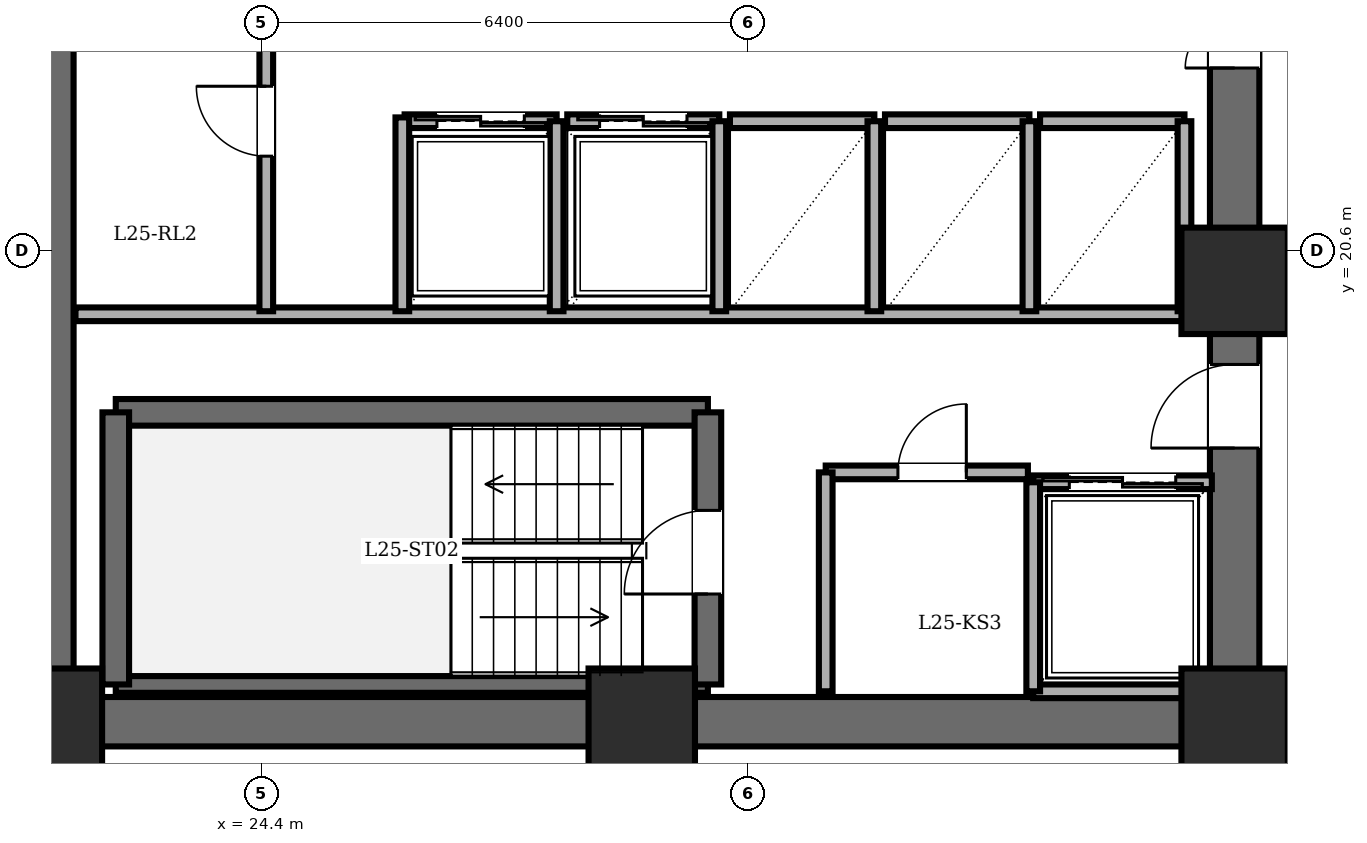
"""IFC4 building model, lengths in metres.
Left out: names, types, materials, properties, quantities, classifications, styles, units other than length and angle.
Written with IfcOpenShell. Run it as: python <this file> out.ifc"""

import sys

from ifc_helpers import new_model, si_unit, direction, frame, frame_2d, origin, origin_2d, place, context, subcontext, project, spatial, rectangle, extrude, element, fill, save


model = new_model("IFC4")
c1 = context("Model", 3, precision=1e-05, world=origin(), true_north=direction((0.0, 1.0)))
c2 = subcontext(c1, "Body", "Model", "MODEL_VIEW")
j1 = project(units=[si_unit("LENGTHUNIT", "METRE"), si_unit("PLANEANGLEUNIT", "RADIAN")], contexts=[c1])
p1 = place(None, origin())
s1 = spatial("IfcSite", under=j1, at=p1, CompositionType="ELEMENT")
p2 = place(p1, origin())
s2 = spatial("IfcBuilding", under=s1, at=p2, CompositionType="ELEMENT")
p3 = place(p2, frame((0.0, 0.0, 97.1)))
s3 = spatial("IfcBuildingStorey", under=s2, at=p3, CompositionType="ELEMENT", Elevation=97.1)
for number, where, z_axis, x_axis in (
    (1, (21.6, 14.4, 0.0), (0.0, 0.0, 1.0), (1.0, 0.0, 0.0)),
    (2, (29.4, 14.4, 0.0), (0.0, 0.0, 1.0), (1.0, 0.0, 0.0)),
    (3, (37.2, 14.4, 0.0), (0.0, 0.0, 1.0), (1.0, 0.0, 0.0)),
    (4, (37.2, 20.2, 0.0), (0.0, 0.0, 1.0), (1.0, 0.0, 0.0)),
):
    element("IfcColumn", number, at=place(p3, frame(where, z_axis=z_axis, x_axis=x_axis)), inside=s3, PredefinedType="COLUMN", context=c2, shape_type="SweptSolid", body=[
        extrude(rectangle(XDim=1.4, YDim=1.4, at=origin_2d()), origin(), (0.0, 0.0, 1.0), 3.6),
    ])
p4 = place(p3, frame((21.6, 14.4, 0.0), z_axis=(0.0, 0.0, 1.0), x_axis=(0.0, 1.0, 0.0)))
e5 = element("IfcWall", 5, at=p4, inside=s3, PredefinedType="SHEAR", context=c2, shape_type="SweptSolid", body=[
    extrude(rectangle(XDim=19.2, YDim=0.65, at=frame_2d((9.6, 0.0))), origin(), (0.0, 0.0, 1.0), 3.4),
])
p5 = place(p3, frame((37.2, 14.4, 0.0), z_axis=(0.0, 0.0, 1.0), x_axis=(-1.0, 0.0, 0.0)))
e6 = element("IfcWall", 6, at=p5, inside=s3, PredefinedType="SHEAR", context=c2, shape_type="SweptSolid", body=[
    extrude(rectangle(XDim=15.6, YDim=0.65, at=frame_2d((7.8, 0.0))), origin(), (0.0, 0.0, 1.0), 3.4),
])
p6 = place(p3, frame((37.2, 14.4, 0.0), z_axis=(0.0, 0.0, 1.0), x_axis=(0.0, 1.0, 0.0)))
e7 = element("IfcWall", 7, at=p6, inside=s3, PredefinedType="SHEAR", context=c2, shape_type="SweptSolid", body=[
    extrude(rectangle(XDim=19.2, YDim=0.65, at=frame_2d((9.6, 0.0))), origin(), (0.0, 0.0, 1.0), 3.4),
])
p7 = place(p6, frame((15.8, 0.0, 0.0)))
e8 = element("IfcOpeningElement", 8, at=p7, cuts=e7, PredefinedType="OPENING", context=c2, shape_type="SweptSolid", body=[
    extrude(rectangle(XDim=1.15, YDim=2.15, at=frame_2d((0.575, 1.075))), frame((0.0, 0.335, 0.0), z_axis=(0.0, -1.0, 0.0), x_axis=(1.0, 0.0, 0.0)), (0.0, 0.0, 1.0), 0.67),
])
p8 = place(p6, frame((3.6, 0.0, 0.0)))
e9 = element("IfcOpeningElement", 9, at=p8, cuts=e7, PredefinedType="OPENING", context=c2, shape_type="SweptSolid", body=[
    extrude(rectangle(XDim=1.1, YDim=2.15, at=frame_2d((0.55, 1.075))), frame((0.0, 0.335, 0.0), z_axis=(0.0, -1.0, 0.0), x_axis=(1.0, 0.0, 0.0)), (0.0, 0.0, 1.0), 0.67),
])
p9 = place(p6, frame((8.6, 0.0, 0.0)))
e10 = element("IfcOpeningElement", 10, at=p9, cuts=e7, PredefinedType="OPENING", context=c2, shape_type="SweptSolid", body=[
    extrude(rectangle(XDim=1.3, YDim=2.2, at=frame_2d((0.65, 1.1))), frame((0.0, 0.335, 0.0), z_axis=(0.0, -1.0, 0.0), x_axis=(1.0, 0.0, 0.0)), (0.0, 0.0, 1.0), 0.67),
])
p10 = place(p3, frame((22.48, 18.47, 0.0), z_axis=(0.0, 0.0, 1.0), x_axis=(1.0, 0.0, 0.0)))
e11 = element("IfcWall", 11, at=p10, inside=s3, PredefinedType="SOLIDWALL", context=c2, shape_type="SweptSolid", body=[
    extrude(rectangle(XDim=7.79, YDim=0.35, at=frame_2d((3.895, 0.0))), origin(), (0.0, 0.0, 1.0), 3.4),
])
p11 = place(p3, frame((22.48, 14.89, 0.0), z_axis=(0.0, 0.0, 1.0), x_axis=(1.0, 0.0, 0.0)))
e12 = element("IfcWall", 12, at=p11, inside=s3, PredefinedType="PARTITIONING", context=c2, shape_type="SweptSolid", body=[
    extrude(rectangle(XDim=7.79, YDim=0.22, at=frame_2d((3.895, 0.0))), origin(), (0.0, 0.0, 1.0), 3.4),
])
p12 = place(p3, frame((22.48, 14.89, 0.0), z_axis=(0.0, 0.0, 1.0), x_axis=(0.0, 1.0, 0.0)))
e13 = element("IfcWall", 13, at=p12, inside=s3, PredefinedType="SOLIDWALL", context=c2, shape_type="SweptSolid", body=[
    extrude(rectangle(XDim=3.58, YDim=0.35, at=frame_2d((1.79, 0.0))), origin(), (0.0, 0.0, 1.0), 3.4),
])
p13 = place(p3, frame((30.27, 14.89, 0.0), z_axis=(0.0, 0.0, 1.0), x_axis=(0.0, 1.0, 0.0)))
e14 = element("IfcWall", 14, at=p13, inside=s3, PredefinedType="SOLIDWALL", context=c2, shape_type="SweptSolid", body=[
    extrude(rectangle(XDim=3.58, YDim=0.35, at=frame_2d((1.79, 0.0))), origin(), (0.0, 0.0, 1.0), 3.4),
])
p14 = place(p13, frame((1.19, 0.0, 0.0)))
e15 = element("IfcOpeningElement", 15, at=p14, cuts=e14, PredefinedType="OPENING", context=c2, shape_type="SweptSolid", body=[
    extrude(rectangle(XDim=1.1, YDim=2.15, at=frame_2d((0.55, 1.075))), frame((0.0, 0.185, 0.0), z_axis=(0.0, -1.0, 0.0), x_axis=(1.0, 0.0, 0.0)), (0.0, 0.0, 1.0), 0.37),
])
p15 = place(p3, frame((21.95, 19.76, 0.0), z_axis=(0.0, 0.0, 1.0), x_axis=(1.0, 0.0, 0.0)))
e16 = element("IfcWall", 16, at=p15, inside=s3, PredefinedType="PARTITIONING", context=c2, shape_type="SweptSolid", body=[
    extrude(rectangle(XDim=14.87, YDim=0.18, at=frame_2d((7.435, 0.0))), origin(), (0.0, 0.0, 1.0), 3.4),
])
p16 = place(p3, frame((31.82, 17.68, 0.0), z_axis=(0.0, 0.0, 1.0), x_axis=(1.0, 0.0, 0.0)))
e17 = element("IfcWall", 17, at=p16, inside=s3, PredefinedType="PARTITIONING", context=c2, shape_type="SweptSolid", body=[
    extrude(rectangle(XDim=2.66, YDim=0.18, at=frame_2d((1.33, 0.0))), origin(), (0.0, 0.0, 1.0), 3.4),
])
p17 = place(p16, frame((0.95, 0.0, 0.0)))
e18 = element("IfcOpeningElement", 18, at=p17, cuts=e17, PredefinedType="OPENING", context=c2, shape_type="SweptSolid", body=[
    extrude(rectangle(XDim=0.9, YDim=2.05, at=frame_2d((0.45, 1.025))), frame((0.0, 0.1, 0.0), z_axis=(0.0, -1.0, 0.0), x_axis=(1.0, 0.0, 0.0)), (0.0, 0.0, 1.0), 0.2),
])
p18 = place(p3, frame((31.82, 14.8, 0.0), z_axis=(0.0, 0.0, 1.0), x_axis=(0.0, 1.0, 0.0)))
e19 = element("IfcWall", 19, at=p18, inside=s3, PredefinedType="PARTITIONING", context=c2, shape_type="SweptSolid", body=[
    extrude(rectangle(XDim=2.88, YDim=0.18, at=frame_2d((1.44, 0.0))), origin(), (0.0, 0.0, 1.0), 3.4),
])
p19 = place(p3, frame((34.55, 17.55, 0.0), z_axis=(0.0, 0.0, 1.0), x_axis=(1.0, 0.0, 0.0)))
e20 = element("IfcWall", 20, at=p19, inside=s3, PredefinedType="PARTITIONING", context=c2, shape_type="SweptSolid", body=[
    extrude(rectangle(XDim=2.35, YDim=0.18, at=frame_2d((1.175, 0.0))), origin(), (0.0, 0.0, 1.0), 3.4),
])
p20 = place(p19, frame((0.475, 0.0, 0.0)))
e21 = element("IfcOpeningElement", 21, at=p20, cuts=e20, PredefinedType="OPENING", context=c2, shape_type="SweptSolid", body=[
    extrude(rectangle(XDim=1.4, YDim=2.3, at=frame_2d((0.7, 1.15))), frame((0.0, 0.1, 0.0), z_axis=(0.0, -1.0, 0.0), x_axis=(1.0, 0.0, 0.0)), (0.0, 0.0, 1.0), 0.2),
])
p21 = place(p3, frame((36.9, 14.8, 0.0), z_axis=(0.0, 0.0, 1.0), x_axis=(-1.0, 0.0, 0.0)))
e22 = element("IfcWall", 22, at=p21, inside=s3, PredefinedType="PARTITIONING", context=c2, shape_type="SweptSolid", body=[
    extrude(rectangle(XDim=2.35, YDim=0.18, at=frame_2d((1.175, 0.0))), origin(), (0.0, 0.0, 1.0), 3.4),
])
p22 = place(p3, frame((34.55, 17.55, 0.0), z_axis=(0.0, 0.0, 1.0), x_axis=(0.0, -1.0, 0.0)))
e23 = element("IfcWall", 23, at=p22, inside=s3, PredefinedType="PARTITIONING", context=c2, shape_type="SweptSolid", body=[
    extrude(rectangle(XDim=2.75, YDim=0.18, at=frame_2d((1.375, 0.0))), origin(), (0.0, 0.0, 1.0), 3.4),
])
p23 = place(p3, frame((26.28, 22.3, 0.0), z_axis=(0.0, 0.0, 1.0), x_axis=(1.0, 0.0, 0.0)))
e24 = element("IfcWall", 24, at=p23, inside=s3, PredefinedType="PARTITIONING", context=c2, shape_type="SweptSolid", body=[
    extrude(rectangle(XDim=2.0, YDim=0.18, at=frame_2d((1.0, 0.0))), origin(), (0.0, 0.0, 1.0), 3.4),
])
p24 = place(p23, frame((0.425, 0.0, 0.0)))
e25 = element("IfcOpeningElement", 25, at=p24, cuts=e24, PredefinedType="OPENING", context=c2, shape_type="SweptSolid", body=[
    extrude(rectangle(XDim=1.15, YDim=2.2, at=frame_2d((0.575, 1.1))), frame((0.0, 0.1, 0.0), z_axis=(0.0, -1.0, 0.0), x_axis=(1.0, 0.0, 0.0)), (0.0, 0.0, 1.0), 0.2),
])
p25 = place(p3, frame((28.28, 19.8, 0.0), z_axis=(0.0, 0.0, 1.0), x_axis=(0.0, 1.0, 0.0)))
e26 = element("IfcWall", 26, at=p25, inside=s3, PredefinedType="PARTITIONING", context=c2, shape_type="SweptSolid", body=[
    extrude(rectangle(XDim=2.5, YDim=0.18, at=frame_2d((1.25, 0.0))), origin(), (0.0, 0.0, 1.0), 3.4),
])
p26 = place(p3, frame((28.42, 22.3, 0.0), z_axis=(0.0, 0.0, 1.0), x_axis=(1.0, 0.0, 0.0)))
e27 = element("IfcWall", 27, at=p26, inside=s3, PredefinedType="PARTITIONING", context=c2, shape_type="SweptSolid", body=[
    extrude(rectangle(XDim=2.0, YDim=0.18, at=frame_2d((1.0, 0.0))), origin(), (0.0, 0.0, 1.0), 3.4),
])
p27 = place(p26, frame((0.425, 0.0, 0.0)))
e28 = element("IfcOpeningElement", 28, at=p27, cuts=e27, PredefinedType="OPENING", context=c2, shape_type="SweptSolid", body=[
    extrude(rectangle(XDim=1.15, YDim=2.2, at=frame_2d((0.575, 1.1))), frame((0.0, 0.1, 0.0), z_axis=(0.0, -1.0, 0.0), x_axis=(1.0, 0.0, 0.0)), (0.0, 0.0, 1.0), 0.2),
])
p28 = place(p3, frame((30.42, 19.8, 0.0), z_axis=(0.0, 0.0, 1.0), x_axis=(0.0, 1.0, 0.0)))
e29 = element("IfcWall", 29, at=p28, inside=s3, PredefinedType="PARTITIONING", context=c2, shape_type="SweptSolid", body=[
    extrude(rectangle(XDim=2.5, YDim=0.18, at=frame_2d((1.25, 0.0))), origin(), (0.0, 0.0, 1.0), 3.4),
])
p29 = place(p3, frame((30.56, 22.3, 0.0), z_axis=(0.0, 0.0, 1.0), x_axis=(1.0, 0.0, 0.0)))
e30 = element("IfcWall", 30, at=p29, inside=s3, PredefinedType="PARTITIONING", context=c2, shape_type="SweptSolid", body=[
    extrude(rectangle(XDim=1.9, YDim=0.18, at=frame_2d((0.95, 0.0))), origin(), (0.0, 0.0, 1.0), 3.4),
])
p30 = place(p3, frame((32.46, 19.8, 0.0), z_axis=(0.0, 0.0, 1.0), x_axis=(0.0, 1.0, 0.0)))
e31 = element("IfcWall", 31, at=p30, inside=s3, PredefinedType="PARTITIONING", context=c2, shape_type="SweptSolid", body=[
    extrude(rectangle(XDim=2.5, YDim=0.18, at=frame_2d((1.25, 0.0))), origin(), (0.0, 0.0, 1.0), 3.4),
])
p31 = place(p3, frame((32.6, 22.3, 0.0), z_axis=(0.0, 0.0, 1.0), x_axis=(1.0, 0.0, 0.0)))
e32 = element("IfcWall", 32, at=p31, inside=s3, PredefinedType="PARTITIONING", context=c2, shape_type="SweptSolid", body=[
    extrude(rectangle(XDim=1.9, YDim=0.18, at=frame_2d((0.95, 0.0))), origin(), (0.0, 0.0, 1.0), 3.4),
])
p32 = place(p3, frame((34.5, 19.8, 0.0), z_axis=(0.0, 0.0, 1.0), x_axis=(0.0, 1.0, 0.0)))
e33 = element("IfcWall", 33, at=p32, inside=s3, PredefinedType="PARTITIONING", context=c2, shape_type="SweptSolid", body=[
    extrude(rectangle(XDim=2.5, YDim=0.18, at=frame_2d((1.25, 0.0))), origin(), (0.0, 0.0, 1.0), 3.4),
])
p33 = place(p3, frame((34.64, 22.3, 0.0), z_axis=(0.0, 0.0, 1.0), x_axis=(1.0, 0.0, 0.0)))
e34 = element("IfcWall", 34, at=p33, inside=s3, PredefinedType="PARTITIONING", context=c2, shape_type="SweptSolid", body=[
    extrude(rectangle(XDim=1.9, YDim=0.18, at=frame_2d((0.95, 0.0))), origin(), (0.0, 0.0, 1.0), 3.4),
])
p34 = place(p3, frame((36.54, 19.8, 0.0), z_axis=(0.0, 0.0, 1.0), x_axis=(0.0, 1.0, 0.0)))
e35 = element("IfcWall", 35, at=p34, inside=s3, PredefinedType="PARTITIONING", context=c2, shape_type="SweptSolid", body=[
    extrude(rectangle(XDim=2.5, YDim=0.18, at=frame_2d((1.25, 0.0))), origin(), (0.0, 0.0, 1.0), 3.4),
])
p35 = place(p3, frame((24.46, 19.8, 0.0), z_axis=(0.0, 0.0, 1.0), x_axis=(0.0, 1.0, 0.0)))
e36 = element("IfcWall", 36, at=p35, inside=s3, PredefinedType="PARTITIONING", context=c2, shape_type="SweptSolid", body=[
    extrude(rectangle(XDim=5.0, YDim=0.18, at=frame_2d((2.5, 0.0))), origin(), (0.0, 0.0, 1.0), 3.4),
])
p36 = place(p35, frame((2.04, 0.0, 0.0)))
e37 = element("IfcOpeningElement", 37, at=p36, cuts=e36, PredefinedType="OPENING", context=c2, shape_type="SweptSolid", body=[
    extrude(rectangle(XDim=0.92, YDim=2.1, at=frame_2d((0.46, 1.05))), frame((0.0, 0.1, 0.0), z_axis=(0.0, -1.0, 0.0), x_axis=(1.0, 0.0, 0.0)), (0.0, 0.0, 1.0), 0.2),
])
p37 = place(p3, frame((26.25, 19.8, 0.0), z_axis=(0.0, 0.0, 1.0), x_axis=(0.0, 1.0, 0.0)))
e38 = element("IfcWall", 38, at=p37, inside=s3, PredefinedType="PARTITIONING", context=c2, shape_type="SweptSolid", body=[
    extrude(rectangle(XDim=2.55, YDim=0.18, at=frame_2d((1.275, 0.0))), origin(), (0.0, 0.0, 1.0), 3.4),
])
p38 = place(p14, origin())
e39 = element("IfcDoor", 39, at=p38, inside=s3, OperationType="SINGLE_SWING_LEFT", PredefinedType="DOOR", context=c2, shape_type="SweptSolid", body=[
    extrude(rectangle(XDim=1.1, YDim=2.15, at=frame_2d((0.55, 1.075))), frame((0.0, 0.025, 0.0), z_axis=(0.0, -1.0, 0.0), x_axis=(1.0, 0.0, 0.0)), (0.0, 0.0, 1.0), 0.05),
])
fill(e15, e39)
p39 = place(p8, origin())
e40 = element("IfcDoor", 40, at=p39, inside=s3, OperationType="SINGLE_SWING_LEFT", PredefinedType="DOOR", context=c2, shape_type="SweptSolid", body=[
    extrude(rectangle(XDim=1.1, YDim=2.15, at=frame_2d((0.55, 1.075))), frame((0.0, 0.025, 0.0), z_axis=(0.0, -1.0, 0.0), x_axis=(1.0, 0.0, 0.0)), (0.0, 0.0, 1.0), 0.05),
])
fill(e9, e40)
p40 = place(p17, origin())
e41 = element("IfcDoor", 41, at=p40, inside=s3, OperationType="SINGLE_SWING_RIGHT", PredefinedType="DOOR", context=c2, shape_type="SweptSolid", body=[
    extrude(rectangle(XDim=0.9, YDim=2.05, at=frame_2d((0.45, 1.025))), frame((0.0, 0.025, 0.0), z_axis=(0.0, -1.0, 0.0), x_axis=(1.0, 0.0, 0.0)), (0.0, 0.0, 1.0), 0.05),
])
fill(e18, e41)
p41 = place(p20, origin())
e42 = element("IfcDoor", 42, at=p41, inside=s3, OperationType="DOUBLE_DOOR_SLIDING", PredefinedType="DOOR", context=c2, shape_type="SweptSolid", body=[
    extrude(rectangle(XDim=1.4, YDim=2.3, at=frame_2d((0.7, 1.15))), frame((0.0, 0.025, 0.0), z_axis=(0.0, -1.0, 0.0), x_axis=(1.0, 0.0, 0.0)), (0.0, 0.0, 1.0), 0.05),
])
fill(e21, e42)
p42 = place(p24, origin())
e43 = element("IfcDoor", 43, at=p42, inside=s3, OperationType="DOUBLE_DOOR_SLIDING", PredefinedType="DOOR", context=c2, shape_type="SweptSolid", body=[
    extrude(rectangle(XDim=1.15, YDim=2.2, at=frame_2d((0.575, 1.1))), frame((0.0, 0.025, 0.0), z_axis=(0.0, -1.0, 0.0), x_axis=(1.0, 0.0, 0.0)), (0.0, 0.0, 1.0), 0.05),
])
fill(e25, e43)
p43 = place(p27, origin())
e44 = element("IfcDoor", 44, at=p43, inside=s3, OperationType="DOUBLE_DOOR_SLIDING", PredefinedType="DOOR", context=c2, shape_type="SweptSolid", body=[
    extrude(rectangle(XDim=1.15, YDim=2.2, at=frame_2d((0.575, 1.1))), frame((0.0, 0.025, 0.0), z_axis=(0.0, -1.0, 0.0), x_axis=(1.0, 0.0, 0.0)), (0.0, 0.0, 1.0), 0.05),
])
fill(e28, e44)
p44 = place(p36, origin())
e45 = element("IfcDoor", 45, at=p44, inside=s3, OperationType="SINGLE_SWING_RIGHT", PredefinedType="DOOR", context=c2, shape_type="SweptSolid", body=[
    extrude(rectangle(XDim=0.92, YDim=2.1, at=frame_2d((0.46, 1.05))), frame((0.0, 0.025, 0.0), z_axis=(0.0, -1.0, 0.0), x_axis=(1.0, 0.0, 0.0)), (0.0, 0.0, 1.0), 0.05),
])
fill(e37, e45)
p45 = place(p9, origin())
e46 = element("IfcDoor", 46, at=p45, inside=s3, OperationType="DOUBLE_DOOR_SINGLE_SWING", PredefinedType="DOOR", context=c2, shape_type="SweptSolid", body=[
    extrude(rectangle(XDim=1.3, YDim=2.2, at=frame_2d((0.65, 1.1))), frame((0.0, 0.025, 0.0), z_axis=(0.0, -1.0, 0.0), x_axis=(1.0, 0.0, 0.0)), (0.0, 0.0, 1.0), 0.05),
])
fill(e10, e46)
save(model, sys.argv[1])
